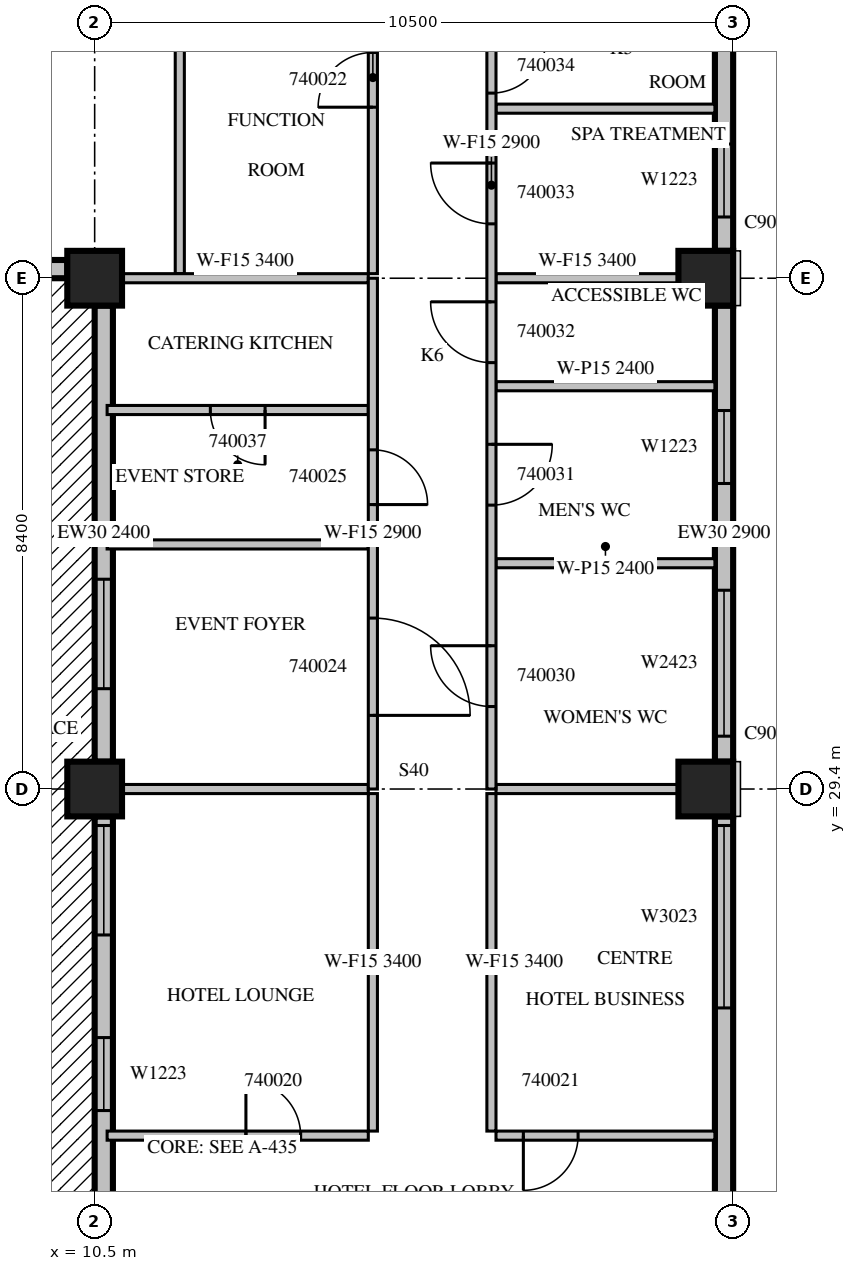
"""IFC4 building model, lengths in metres.
Left out: names, types, materials, properties, quantities, classifications, styles, units other than length and angle.
Written with IfcOpenShell. Run it as: python <this file> out.ifc"""

import sys

from ifc_helpers import new_model, si_unit, direction, frame, frame_2d, origin, origin_2d, place, context, subcontext, project, spatial, rectangle, extrude, source, transform, mapped, element, fill, save


model = new_model("IFC4")
c1 = context("Model", 3, precision=1e-05, world=origin(), true_north=direction((0.0, 1.0)))
c2 = subcontext(c1, "Body", "Model", "MODEL_VIEW")
j1 = project(units=[si_unit("LENGTHUNIT", "METRE"), si_unit("PLANEANGLEUNIT", "RADIAN")], contexts=[c1])
p1 = place(None, origin())
s1 = spatial("IfcSite", under=j1, at=p1, CompositionType="ELEMENT")
p2 = place(p1, origin())
s2 = spatial("IfcBuilding", under=s1, at=p2, CompositionType="ELEMENT")
p3 = place(p2, frame((0.0, 0.0, 185.4)))
s3 = spatial("IfcBuildingStorey", under=s2, at=p3, CompositionType="ELEMENT", Elevation=185.4)
m1 = source(origin(), c2, "Body", "SweptSolid", [
    extrude(rectangle(XDim=0.9, YDim=0.9, at=origin_2d()), origin(), (0.0, 0.0, 1.0), 3.8),
])
for number, where, z_axis, x_axis in (
    (1, (10.5, 29.4, 0.0), (0.0, 0.0, 1.0), (1.0, 0.0, 0.0)),
    (2, (20.55, 29.4, 0.0), (0.0, 0.0, 1.0), (1.0, 0.0, 0.0)),
    (3, (10.5, 37.8, 0.0), (0.0, 0.0, 1.0), (1.0, 0.0, 0.0)),
    (4, (20.55, 37.8, 0.0), (0.0, 0.0, 1.0), (1.0, 0.0, 0.0)),
):
    element("IfcColumn", number, at=place(p3, frame(where, z_axis=z_axis, x_axis=x_axis)), inside=s3, PredefinedType="COLUMN", context=c2, shape_type="MappedRepresentation", body=[
        mapped(m1, transform((0.0, 0.0, 0.0), scale=1.0)),
    ])
m2 = source(origin(), c2, "Body", "SweptSolid", [
    extrude(rectangle(XDim=7.15, YDim=0.3, at=frame_2d((3.575, 0.0))), origin(), (0.0, 0.0, 1.0), 3.4),
])
p4 = place(p3, frame((20.85, 21.8, 0.0), z_axis=(0.0, 0.0, 1.0), x_axis=(0.0, 1.0, 0.0)))
e5 = element("IfcWall", 5, at=p4, inside=s3, PredefinedType="STANDARD", context=c2, shape_type="MappedRepresentation", body=[
    mapped(m2, transform((0.0, 0.0, 0.0), scale=1.0)),
])
m3 = source(origin(), c2, "Body", "SweptSolid", [
    extrude(rectangle(XDim=3.0, YDim=2.3, at=frame_2d((1.5, 1.15))), frame((0.0, 0.16, 0.0), z_axis=(0.0, -1.0, 0.0), x_axis=(1.0, 0.0, 0.0)), (0.0, 0.0, 1.0), 0.32),
])
p5 = place(p4, frame((4.0, 0.0, 0.6)))
e6 = element("IfcOpeningElement", 6, at=p5, cuts=e5, PredefinedType="OPENING", context=c2, shape_type="MappedRepresentation", body=[
    mapped(m3, transform((0.0, 0.0, 0.0), scale=1.0)),
])
m4 = source(origin(), c2, "Body", "SweptSolid", [
    extrude(rectangle(XDim=7.5, YDim=0.3, at=frame_2d((3.75, 0.0))), origin(), (0.0, 0.0, 1.0), 2.9),
])
p6 = place(p3, frame((20.85, 29.85, 0.0), z_axis=(0.0, 0.0, 1.0), x_axis=(0.0, 1.0, 0.0)))
e7 = element("IfcWall", 7, at=p6, inside=s3, PredefinedType="STANDARD", context=c2, shape_type="MappedRepresentation", body=[
    mapped(m4, transform((0.0, 0.0, 0.0), scale=1.0)),
])
m5 = source(origin(), c2, "Body", "SweptSolid", [
    extrude(rectangle(XDim=2.4, YDim=2.3, at=frame_2d((1.2, 1.15))), frame((0.0, 0.16, 0.0), z_axis=(0.0, -1.0, 0.0), x_axis=(1.0, 0.0, 0.0)), (0.0, 0.0, 1.0), 0.32),
])
p7 = place(p6, frame((0.419, 0.0, 0.6)))
e8 = element("IfcOpeningElement", 8, at=p7, cuts=e7, PredefinedType="OPENING", context=c2, shape_type="MappedRepresentation", body=[
    mapped(m5, transform((0.0, 0.0, 0.0), scale=1.0)),
])
m6 = source(origin(), c2, "Body", "SweptSolid", [
    extrude(rectangle(XDim=1.2, YDim=2.3, at=frame_2d((0.6, 1.15))), frame((0.0, 0.16, 0.0), z_axis=(0.0, -1.0, 0.0), x_axis=(1.0, 0.0, 0.0)), (0.0, 0.0, 1.0), 0.32),
])
p8 = place(p6, frame((4.574, 0.0, 0.6)))
e9 = element("IfcOpeningElement", 9, at=p8, cuts=e7, PredefinedType="OPENING", context=c2, shape_type="MappedRepresentation", body=[
    mapped(m6, transform((0.0, 0.0, 0.0), scale=1.0)),
])
m7 = source(origin(), c2, "Body", "SweptSolid", [
    extrude(rectangle(XDim=3.75, YDim=0.3, at=frame_2d((1.875, 0.0))), origin(), (0.0, 0.0, 1.0), 3.4),
])
p9 = place(p3, frame((20.85, 38.25, 0.0), z_axis=(0.0, 0.0, 1.0), x_axis=(0.0, 1.0, 0.0)))
e10 = element("IfcWall", 10, at=p9, inside=s3, PredefinedType="STANDARD", context=c2, shape_type="MappedRepresentation", body=[
    mapped(m7, transform((0.0, 0.0, 0.0), scale=1.0)),
])
p10 = place(p9, frame((0.557, 0.0, 0.6)))
e11 = element("IfcOpeningElement", 11, at=p10, cuts=e10, PredefinedType="OPENING", context=c2, shape_type="MappedRepresentation", body=[
    mapped(m6, transform((0.0, 0.0, 0.0), scale=1.0)),
])
p11 = place(p3, frame((8.7, 37.95, 0.0), z_axis=(0.0, 0.0, 1.0), x_axis=(1.0, 0.0, 0.0)))
e12 = element("IfcWall", 12, at=p11, inside=s3, PredefinedType="STANDARD", context=c2, shape_type="SweptSolid", body=[
    extrude(rectangle(XDim=1.35, YDim=0.3, at=frame_2d((0.675, 0.0))), origin(), (0.0, 0.0, 1.0), 3.4),
])
p12 = place(p3, frame((10.65, 37.35, 0.0), z_axis=(0.0, 0.0, 1.0), x_axis=(0.0, -1.0, 0.0)))
e13 = element("IfcWall", 13, at=p12, inside=s3, PredefinedType="STANDARD", context=c2, shape_type="SweptSolid", body=[
    extrude(rectangle(XDim=7.5, YDim=0.3, at=frame_2d((3.75, 0.0))), origin(), (0.0, 0.0, 1.0), 2.4),
])
m8 = source(origin(), c2, "Body", "SweptSolid", [
    extrude(rectangle(XDim=1.8, YDim=2.4, at=frame_2d((0.9, 1.2))), frame((0.0, 0.16, 0.0), z_axis=(0.0, -1.0, 0.0), x_axis=(1.0, 0.0, 0.0)), (0.0, 0.0, 1.0), 0.32),
])
p13 = place(p12, frame((4.5, 0.0, 0.0)))
e14 = element("IfcOpeningElement", 14, at=p13, cuts=e13, PredefinedType="OPENING", context=c2, shape_type="MappedRepresentation", body=[
    mapped(m8, transform((0.0, 0.0, 0.0), scale=1.0)),
])
p14 = place(p3, frame((10.65, 28.95, 0.0), z_axis=(0.0, 0.0, 1.0), x_axis=(0.0, -1.0, 0.0)))
e15 = element("IfcWall", 15, at=p14, inside=s3, PredefinedType="STANDARD", context=c2, shape_type="MappedRepresentation", body=[
    mapped(m2, transform((0.0, 0.0, 0.0), scale=1.0)),
])
p15 = place(p14, frame((0.15, 0.0, 0.0)))
e16 = element("IfcOpeningElement", 16, at=p15, cuts=e15, PredefinedType="OPENING", context=c2, shape_type="MappedRepresentation", body=[
    mapped(m8, transform((0.0, 0.0, 0.0), scale=1.0)),
])
p16 = place(p14, frame((3.638, 0.0, 0.6)))
e17 = element("IfcOpeningElement", 17, at=p16, cuts=e15, PredefinedType="OPENING", context=c2, shape_type="MappedRepresentation", body=[
    mapped(m6, transform((0.0, 0.0, 0.0), scale=1.0)),
])
p17 = place(p3, frame((10.705, 23.7, 0.0), z_axis=(0.0, 0.0, 1.0), x_axis=(1.0, 0.0, 0.0)))
e18 = element("IfcWall", 18, at=p17, inside=s3, PredefinedType="PARTITIONING", context=c2, shape_type="SweptSolid", body=[
    extrude(rectangle(XDim=4.295, YDim=0.15, at=frame_2d((2.147, 0.0))), origin(), (0.0, 0.0, 1.0), 3.4),
])
m9 = source(origin(), c2, "Body", "SweptSolid", [
    extrude(rectangle(XDim=0.9, YDim=2.1, at=frame_2d((0.45, 1.05))), frame((0.0, 0.085, 0.0), z_axis=(0.0, -1.0, 0.0), x_axis=(1.0, 0.0, 0.0)), (0.0, 0.0, 1.0), 0.17),
])
p18 = place(p17, frame((2.283, 0.0, 0.0)))
e19 = element("IfcOpeningElement", 19, at=p18, cuts=e18, PredefinedType="OPENING", context=c2, shape_type="MappedRepresentation", body=[
    mapped(m9, transform((0.0, 0.0, 0.0), scale=1.0)),
])
m10 = source(origin(), c2, "Body", "SweptSolid", [
    extrude(rectangle(XDim=3.6, YDim=0.15, at=frame_2d((1.8, 0.0))), origin(), (0.0, 0.0, 1.0), 3.4),
])
p19 = place(p3, frame((17.1, 23.7, 0.0), z_axis=(0.0, 0.0, 1.0), x_axis=(1.0, 0.0, 0.0)))
e20 = element("IfcWall", 20, at=p19, inside=s3, PredefinedType="PARTITIONING", context=c2, shape_type="MappedRepresentation", body=[
    mapped(m10, transform((0.0, 0.0, 0.0), scale=1.0)),
])
p20 = place(p19, frame((0.45, 0.0, 0.0)))
e21 = element("IfcOpeningElement", 21, at=p20, cuts=e20, PredefinedType="OPENING", context=c2, shape_type="MappedRepresentation", body=[
    mapped(m9, transform((0.0, 0.0, 0.0), scale=1.0)),
])
m11 = source(origin(), c2, "Body", "SweptSolid", [
    extrude(rectangle(XDim=5.55, YDim=0.15, at=frame_2d((2.775, 0.0))), origin(), (0.0, 0.0, 1.0), 3.4),
])
for number, where, z_axis, x_axis in (
    (22, (15.075, 23.775, 0.0), (0.0, 0.0, 1.0), (0.0, 1.0, 0.0)),
    (23, (17.025, 29.325, 0.0), (0.0, 0.0, 1.0), (0.0, -1.0, 0.0)),
):
    element("IfcWall", number, at=place(p3, frame(where, z_axis=z_axis, x_axis=x_axis)), inside=s3, PredefinedType="PARTITIONING", context=c2, shape_type="MappedRepresentation", body=[
        mapped(m11, transform((0.0, 0.0, 0.0), scale=1.0)),
    ])
m12 = source(origin(), c2, "Body", "SweptSolid", [
    extrude(rectangle(XDim=4.051, YDim=0.15, at=frame_2d((2.026, 0.0))), origin(), (0.0, 0.0, 1.0), 3.4),
])
p21 = place(p3, frame((15.0, 29.4, 0.0), z_axis=(0.0, 0.0, 1.0), x_axis=(-1.0, 0.0, 0.0)))
e24 = element("IfcWall", 24, at=p21, inside=s3, PredefinedType="PARTITIONING", context=c2, shape_type="MappedRepresentation", body=[
    mapped(m12, transform((0.0, 0.0, 0.0), scale=1.0)),
])
m13 = source(origin(), c2, "Body", "SweptSolid", [
    extrude(rectangle(XDim=3.001, YDim=0.15, at=frame_2d((1.5, 0.0))), origin(), (0.0, 0.0, 1.0), 3.4),
])
p22 = place(p3, frame((20.101, 29.4, 0.0), z_axis=(0.0, 0.0, 1.0), x_axis=(-1.0, 0.0, 0.0)))
e25 = element("IfcWall", 25, at=p22, inside=s3, PredefinedType="PARTITIONING", context=c2, shape_type="MappedRepresentation", body=[
    mapped(m13, transform((0.0, 0.0, 0.0), scale=1.0)),
])
m14 = source(origin(), c2, "Body", "SweptSolid", [
    extrude(rectangle(XDim=6.45, YDim=0.15, at=frame_2d((3.225, 0.0))), origin(), (0.0, 0.0, 1.0), 3.4),
])
p23 = place(p3, frame((11.9, 44.325, 0.0), z_axis=(0.0, 0.0, 1.0), x_axis=(0.0, -1.0, 0.0)))
e26 = element("IfcWall", 26, at=p23, inside=s3, PredefinedType="PARTITIONING", context=c2, shape_type="MappedRepresentation", body=[
    mapped(m14, transform((0.0, 0.0, 0.0), scale=1.0)),
])
p24 = place(p3, frame((15.075, 37.875, 0.0), z_axis=(0.0, 0.0, 1.0), x_axis=(0.0, 1.0, 0.0)))
e27 = element("IfcWall", 27, at=p24, inside=s3, PredefinedType="PARTITIONING", context=c2, shape_type="MappedRepresentation", body=[
    mapped(m14, transform((0.0, 0.0, 0.0), scale=1.0)),
])
p25 = place(p24, frame((2.737, 0.0, 0.0)))
e28 = element("IfcOpeningElement", 28, at=p25, cuts=e27, PredefinedType="OPENING", context=c2, shape_type="MappedRepresentation", body=[
    mapped(m9, transform((0.0, 0.0, 0.0), scale=1.0)),
])
m15 = source(origin(), c2, "Body", "SweptSolid", [
    extrude(rectangle(XDim=4.295, YDim=0.15, at=frame_2d((2.147, 0.0))), origin(), (0.0, 0.0, 1.0), 3.4),
])
p26 = place(p3, frame((15.0, 33.422, 0.0), z_axis=(0.0, 0.0, 1.0), x_axis=(-1.0, 0.0, 0.0)))
e29 = element("IfcWall", 29, at=p26, inside=s3, PredefinedType="PARTITIONING", context=c2, shape_type="MappedRepresentation", body=[
    mapped(m15, transform((0.0, 0.0, 0.0), scale=1.0)),
])
p27 = place(p3, frame((15.0, 35.633, 0.0), z_axis=(0.0, 0.0, 1.0), x_axis=(-1.0, 0.0, 0.0)))
e30 = element("IfcWall", 30, at=p27, inside=s3, PredefinedType="PARTITIONING", context=c2, shape_type="MappedRepresentation", body=[
    mapped(m15, transform((0.0, 0.0, 0.0), scale=1.0)),
])
p28 = place(p27, frame((1.698, 0.0, 0.0)))
e31 = element("IfcOpeningElement", 31, at=p28, cuts=e30, PredefinedType="OPENING", context=c2, shape_type="MappedRepresentation", body=[
    mapped(m9, transform((0.0, 0.0, 0.0), scale=1.0)),
])
p29 = place(p3, frame((15.0, 37.8, 0.0), z_axis=(0.0, 0.0, 1.0), x_axis=(-1.0, 0.0, 0.0)))
e32 = element("IfcWall", 32, at=p29, inside=s3, PredefinedType="PARTITIONING", context=c2, shape_type="MappedRepresentation", body=[
    mapped(m12, transform((0.0, 0.0, 0.0), scale=1.0)),
])
p30 = place(p3, frame((17.1, 33.113, 0.0), z_axis=(0.0, 0.0, 1.0), x_axis=(1.0, 0.0, 0.0)))
e33 = element("IfcWall", 33, at=p30, inside=s3, PredefinedType="PARTITIONING", context=c2, shape_type="SweptSolid", body=[
    extrude(rectangle(XDim=3.6, YDim=0.15, at=frame_2d((1.8, 0.0))), origin(), (0.0, 0.0, 1.0), 2.4),
])
m16 = source(origin(), c2, "Body", "SweptSolid", [
    extrude(rectangle(XDim=3.6, YDim=0.15, at=frame_2d((1.8, 0.0))), origin(), (0.0, 0.0, 1.0), 2.4),
])
p31 = place(p3, frame((17.1, 36.024, 0.0), z_axis=(0.0, 0.0, 1.0), x_axis=(1.0, 0.0, 0.0)))
e34 = element("IfcWall", 34, at=p31, inside=s3, PredefinedType="PARTITIONING", context=c2, shape_type="MappedRepresentation", body=[
    mapped(m16, transform((0.0, 0.0, 0.0), scale=1.0)),
])
p32 = place(p3, frame((17.1, 40.589, 0.0), z_axis=(0.0, 0.0, 1.0), x_axis=(1.0, 0.0, 0.0)))
e35 = element("IfcWall", 35, at=p32, inside=s3, PredefinedType="PARTITIONING", context=c2, shape_type="MappedRepresentation", body=[
    mapped(m10, transform((0.0, 0.0, 0.0), scale=1.0)),
])
p33 = place(p3, frame((20.101, 37.8, 0.0), z_axis=(0.0, 0.0, 1.0), x_axis=(-1.0, 0.0, 0.0)))
e36 = element("IfcWall", 36, at=p33, inside=s3, PredefinedType="PARTITIONING", context=c2, shape_type="MappedRepresentation", body=[
    mapped(m13, transform((0.0, 0.0, 0.0), scale=1.0)),
])
p34 = place(p3, frame((15.075, 29.4, 0.0), z_axis=(0.0, 0.0, 1.0), x_axis=(0.0, 1.0, 0.0)))
e37 = element("IfcWall", 37, at=p34, inside=s3, PredefinedType="PARTITIONING", context=c2, shape_type="SweptSolid", body=[
    extrude(rectangle(XDim=8.4, YDim=0.15, at=frame_2d((4.2, 0.0))), origin(), (0.0, 0.0, 1.0), 2.9),
])
m17 = source(origin(), c2, "Body", "SweptSolid", [
    extrude(rectangle(XDim=1.6, YDim=2.1, at=frame_2d((0.8, 1.05))), frame((0.0, 0.085, 0.0), z_axis=(0.0, -1.0, 0.0), x_axis=(1.0, 0.0, 0.0)), (0.0, 0.0, 1.0), 0.17),
])
p35 = place(p34, frame((1.211, 0.0, 0.0)))
e38 = element("IfcOpeningElement", 38, at=p35, cuts=e37, PredefinedType="OPENING", context=c2, shape_type="MappedRepresentation", body=[
    mapped(m17, transform((0.0, 0.0, 0.0), scale=1.0)),
])
p36 = place(p34, frame((4.678, 0.0, 0.0)))
e39 = element("IfcOpeningElement", 39, at=p36, cuts=e37, PredefinedType="OPENING", context=c2, shape_type="MappedRepresentation", body=[
    mapped(m9, transform((0.0, 0.0, 0.0), scale=1.0)),
])
p37 = place(p3, frame((17.025, 49.26, 0.0), z_axis=(0.0, 0.0, 1.0), x_axis=(0.0, -1.0, 0.0)))
e40 = element("IfcWall", 40, at=p37, inside=s3, PredefinedType="PARTITIONING", context=c2, shape_type="SweptSolid", body=[
    extrude(rectangle(XDim=19.86, YDim=0.15, at=frame_2d((9.93, 0.0))), origin(), (0.0, 0.0, 1.0), 2.9),
])
m18 = source(origin(), c2, "Body", "SweptSolid", [
    extrude(rectangle(XDim=1.0, YDim=2.1, at=frame_2d((0.5, 1.05))), frame((0.0, 0.085, 0.0), z_axis=(0.0, -1.0, 0.0), x_axis=(1.0, 0.0, 0.0)), (0.0, 0.0, 1.0), 0.17),
])
p38 = place(p37, frame((17.503, 0.0, 0.0)))
e41 = element("IfcOpeningElement", 41, at=p38, cuts=e40, PredefinedType="OPENING", context=c2, shape_type="MappedRepresentation", body=[
    mapped(m18, transform((0.0, 0.0, 0.0), scale=1.0)),
])
p39 = place(p37, frame((14.191, 0.0, 0.0)))
e42 = element("IfcOpeningElement", 42, at=p39, cuts=e40, PredefinedType="OPENING", context=c2, shape_type="MappedRepresentation", body=[
    mapped(m18, transform((0.0, 0.0, 0.0), scale=1.0)),
])
p40 = place(p37, frame((11.848, 0.0, 0.0)))
e43 = element("IfcOpeningElement", 43, at=p40, cuts=e40, PredefinedType="OPENING", context=c2, shape_type="MappedRepresentation", body=[
    mapped(m18, transform((0.0, 0.0, 0.0), scale=1.0)),
])
p41 = place(p37, frame((9.566, 0.0, 0.0)))
e44 = element("IfcOpeningElement", 44, at=p41, cuts=e40, PredefinedType="OPENING", context=c2, shape_type="MappedRepresentation", body=[
    mapped(m18, transform((0.0, 0.0, 0.0), scale=1.0)),
])
p42 = place(p37, frame((7.516, 0.0, 0.0)))
e45 = element("IfcOpeningElement", 45, at=p42, cuts=e40, PredefinedType="OPENING", context=c2, shape_type="MappedRepresentation", body=[
    mapped(m9, transform((0.0, 0.0, 0.0), scale=1.0)),
])
p43 = place(p37, frame((3.092, 0.0, 0.0)))
e46 = element("IfcOpeningElement", 46, at=p43, cuts=e40, PredefinedType="OPENING", context=c2, shape_type="MappedRepresentation", body=[
    mapped(m18, transform((0.0, 0.0, 0.0), scale=1.0)),
])
m19 = source(origin(), c2, "Body", "SweptSolid", [
    extrude(rectangle(XDim=3.0, YDim=2.3, at=frame_2d((1.5, 1.15))), frame((0.0, 0.03, 0.0), z_axis=(0.0, -1.0, 0.0), x_axis=(1.0, 0.0, 0.0)), (0.0, 0.0, 1.0), 0.06),
])
p44 = place(p5, origin())
e47 = element("IfcWindow", 47, at=p44, inside=s3, PartitioningType="SINGLE_PANEL", PredefinedType="WINDOW", context=c2, shape_type="MappedRepresentation", body=[
    mapped(m19, transform((0.0, 0.0, 0.0), scale=1.0)),
])
fill(e6, e47)
m20 = source(origin(), c2, "Body", "SweptSolid", [
    extrude(rectangle(XDim=2.4, YDim=2.3, at=frame_2d((1.2, 1.15))), frame((0.0, 0.03, 0.0), z_axis=(0.0, -1.0, 0.0), x_axis=(1.0, 0.0, 0.0)), (0.0, 0.0, 1.0), 0.06),
])
p45 = place(p7, origin())
e48 = element("IfcWindow", 48, at=p45, inside=s3, PartitioningType="SINGLE_PANEL", PredefinedType="WINDOW", context=c2, shape_type="MappedRepresentation", body=[
    mapped(m20, transform((0.0, 0.0, 0.0), scale=1.0)),
])
fill(e8, e48)
m21 = source(origin(), c2, "Body", "SweptSolid", [
    extrude(rectangle(XDim=1.2, YDim=2.3, at=frame_2d((0.6, 1.15))), frame((0.0, 0.03, 0.0), z_axis=(0.0, -1.0, 0.0), x_axis=(1.0, 0.0, 0.0)), (0.0, 0.0, 1.0), 0.06),
])
p46 = place(p8, origin())
e49 = element("IfcWindow", 49, at=p46, inside=s3, PartitioningType="SINGLE_PANEL", PredefinedType="WINDOW", context=c2, shape_type="MappedRepresentation", body=[
    mapped(m21, transform((0.0, 0.0, 0.0), scale=1.0)),
])
fill(e9, e49)
p47 = place(p10, origin())
e50 = element("IfcWindow", 50, at=p47, inside=s3, PartitioningType="SINGLE_PANEL", PredefinedType="WINDOW", context=c2, shape_type="MappedRepresentation", body=[
    mapped(m21, transform((0.0, 0.0, 0.0), scale=1.0)),
])
fill(e11, e50)
m22 = source(origin(), c2, "Body", "SweptSolid", [
    extrude(rectangle(XDim=1.8, YDim=2.4, at=frame_2d((0.9, 1.2))), frame((0.0, 0.025, 0.0), z_axis=(0.0, -1.0, 0.0), x_axis=(1.0, 0.0, 0.0)), (0.0, 0.0, 1.0), 0.05),
])
p48 = place(p13, origin())
e51 = element("IfcDoor", 51, at=p48, inside=s3, OperationType="SLIDING_TO_LEFT", PredefinedType="DOOR", context=c2, shape_type="MappedRepresentation", body=[
    mapped(m22, transform((0.0, 0.0, 0.0), scale=1.0)),
])
fill(e14, e51)
p49 = place(p15, origin())
e52 = element("IfcDoor", 52, at=p49, inside=s3, OperationType="SLIDING_TO_LEFT", PredefinedType="DOOR", context=c2, shape_type="MappedRepresentation", body=[
    mapped(m22, transform((0.0, 0.0, 0.0), scale=1.0)),
])
fill(e16, e52)
p50 = place(p16, origin())
e53 = element("IfcWindow", 53, at=p50, inside=s3, PartitioningType="SINGLE_PANEL", PredefinedType="WINDOW", context=c2, shape_type="MappedRepresentation", body=[
    mapped(m21, transform((0.0, 0.0, 0.0), scale=1.0)),
])
fill(e17, e53)
m23 = source(origin(), c2, "Body", "SweptSolid", [
    extrude(rectangle(XDim=0.9, YDim=2.1, at=frame_2d((0.45, 1.05))), frame((0.0, 0.025, 0.0), z_axis=(0.0, -1.0, 0.0), x_axis=(1.0, 0.0, 0.0)), (0.0, 0.0, 1.0), 0.05),
])
p51 = place(p18, origin())
e54 = element("IfcDoor", 54, at=p51, inside=s3, OperationType="SINGLE_SWING_LEFT", PredefinedType="DOOR", context=c2, shape_type="MappedRepresentation", body=[
    mapped(m23, transform((0.0, 0.0, 0.0), scale=1.0)),
])
fill(e19, e54)
p52 = place(p20, origin())
e55 = element("IfcDoor", 55, at=p52, inside=s3, OperationType="SINGLE_SWING_RIGHT", PredefinedType="DOOR", context=c2, shape_type="MappedRepresentation", body=[
    mapped(m23, transform((0.0, 0.0, 0.0), scale=1.0)),
])
fill(e21, e55)
p53 = place(p25, origin())
e56 = element("IfcDoor", 56, at=p53, inside=s3, OperationType="SINGLE_SWING_LEFT", PredefinedType="DOOR", context=c2, shape_type="MappedRepresentation", body=[
    mapped(m23, transform((0.0, 0.0, 0.0), scale=1.0)),
])
fill(e28, e56)
m24 = source(origin(), c2, "Body", "SweptSolid", [
    extrude(rectangle(XDim=1.6, YDim=2.1, at=frame_2d((0.8, 1.05))), frame((0.0, 0.025, 0.0), z_axis=(0.0, -1.0, 0.0), x_axis=(1.0, 0.0, 0.0)), (0.0, 0.0, 1.0), 0.05),
])
p54 = place(p35, origin())
e57 = element("IfcDoor", 57, at=p54, inside=s3, OperationType="SINGLE_SWING_RIGHT", PredefinedType="DOOR", context=c2, shape_type="MappedRepresentation", body=[
    mapped(m24, transform((0.0, 0.0, 0.0), scale=1.0)),
])
fill(e38, e57)
p55 = place(p36, origin())
e58 = element("IfcDoor", 58, at=p55, inside=s3, OperationType="SINGLE_SWING_RIGHT", PredefinedType="DOOR", context=c2, shape_type="MappedRepresentation", body=[
    mapped(m23, transform((0.0, 0.0, 0.0), scale=1.0)),
])
fill(e39, e58)
m25 = source(origin(), c2, "Body", "SweptSolid", [
    extrude(rectangle(XDim=1.0, YDim=2.1, at=frame_2d((0.5, 1.05))), frame((0.0, 0.025, 0.0), z_axis=(0.0, -1.0, 0.0), x_axis=(1.0, 0.0, 0.0)), (0.0, 0.0, 1.0), 0.05),
])
p56 = place(p38, origin())
e59 = element("IfcDoor", 59, at=p56, inside=s3, OperationType="SINGLE_SWING_RIGHT", PredefinedType="DOOR", context=c2, shape_type="MappedRepresentation", body=[
    mapped(m25, transform((0.0, 0.0, 0.0), scale=1.0)),
])
fill(e41, e59)
p57 = place(p39, origin())
e60 = element("IfcDoor", 60, at=p57, inside=s3, OperationType="SINGLE_SWING_LEFT", PredefinedType="DOOR", context=c2, shape_type="MappedRepresentation", body=[
    mapped(m25, transform((0.0, 0.0, 0.0), scale=1.0)),
])
fill(e42, e60)
p58 = place(p40, origin())
e61 = element("IfcDoor", 61, at=p58, inside=s3, OperationType="SINGLE_SWING_RIGHT", PredefinedType="DOOR", context=c2, shape_type="MappedRepresentation", body=[
    mapped(m25, transform((0.0, 0.0, 0.0), scale=1.0)),
])
fill(e43, e61)
p59 = place(p41, origin())
e62 = element("IfcDoor", 62, at=p59, inside=s3, OperationType="SINGLE_SWING_RIGHT", PredefinedType="DOOR", context=c2, shape_type="MappedRepresentation", body=[
    mapped(m25, transform((0.0, 0.0, 0.0), scale=1.0)),
])
fill(e44, e62)
p60 = place(p42, origin())
e63 = element("IfcDoor", 63, at=p60, inside=s3, OperationType="SINGLE_SWING_LEFT", PredefinedType="DOOR", context=c2, shape_type="MappedRepresentation", body=[
    mapped(m23, transform((0.0, 0.0, 0.0), scale=1.0)),
])
fill(e45, e63)
p61 = place(p28, origin())
e64 = element("IfcDoor", 64, at=p61, inside=s3, OperationType="SINGLE_SWING_LEFT", PredefinedType="DOOR", context=c2, shape_type="MappedRepresentation", body=[
    mapped(m23, transform((0.0, 0.0, 0.0), scale=1.0)),
])
fill(e31, e64)
save(model, sys.argv[1])
